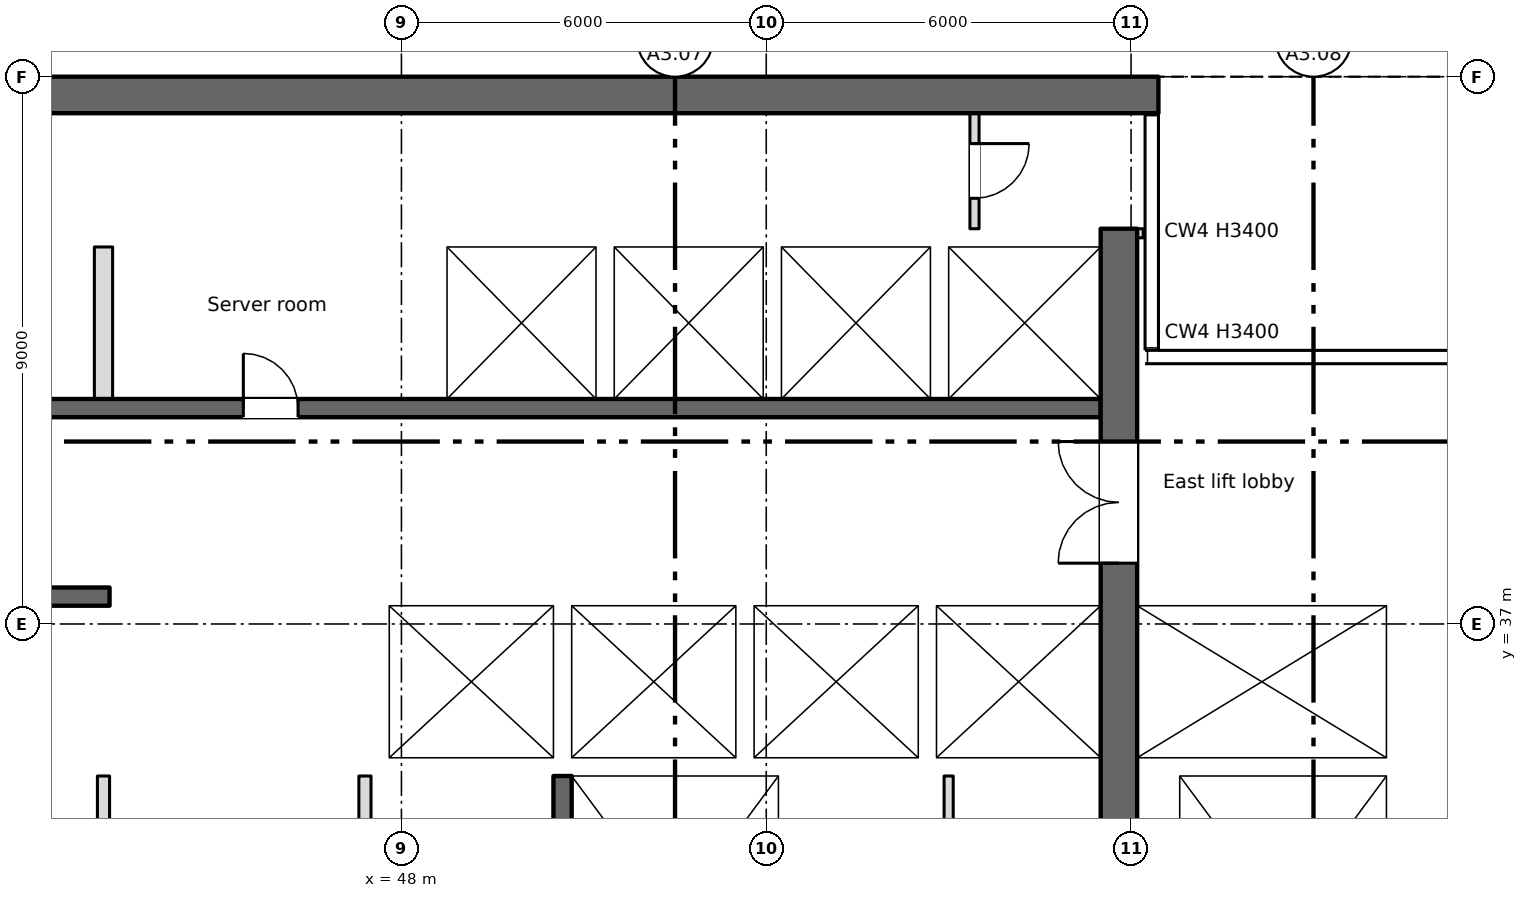
"""IFC4 building model, lengths in metres.
Left out: names, types, materials, properties, quantities, classifications, styles, units other than length and angle.
Written with IfcOpenShell. Run it as: python <this file> out.ifc"""

import sys

from ifc_helpers import new_model, si_unit, direction, frame, frame_2d, origin, place, context, subcontext, project, spatial, rectangle, extrude, element, fill, save


model = new_model("IFC4")
c1 = context("Model", 3, precision=1e-05, world=origin(), true_north=direction((0.0, 1.0)))
c2 = subcontext(c1, "Body", "Model", "MODEL_VIEW")
j1 = project(units=[si_unit("LENGTHUNIT", "METRE"), si_unit("PLANEANGLEUNIT", "RADIAN")], contexts=[c1])
p1 = place(None, origin())
s1 = spatial("IfcSite", under=j1, at=p1, CompositionType="ELEMENT")
p2 = place(p1, origin())
s2 = spatial("IfcBuilding", under=s1, at=p2, CompositionType="ELEMENT")
p3 = place(p2, frame((0.0, 0.0, 239.35)))
s3 = spatial("IfcBuildingStorey", under=s2, at=p3, CompositionType="ELEMENT", Elevation=239.35)
p4 = place(p3, frame((11.55, 45.7, 0.0), z_axis=(0.0, 0.0, 1.0), x_axis=(1.0, 0.0, 0.0)))
e1 = element("IfcWall", 1, at=p4, inside=s3, PredefinedType="SHEAR", context=c2, shape_type="SweptSolid", body=[
    extrude(rectangle(XDim=48.9, YDim=0.6, at=frame_2d((24.45, 0.0))), origin(), (0.0, 0.0, 1.0), 3.4),
])
p5 = place(p4, frame((1.2, 0.0, 0.6)))
e2 = element("IfcOpeningElement", 2, at=p5, cuts=e1, PredefinedType="OPENING", context=c2, shape_type="SweptSolid", body=[
    extrude(rectangle(XDim=0.6, YDim=2.4, at=frame_2d((0.3, 1.2))), frame((0.0, 0.31, 0.0), z_axis=(0.0, -1.0, 0.0), x_axis=(1.0, 0.0, 0.0)), (0.0, 0.0, 1.0), 0.62),
])
p6 = place(p3, frame((64.35, 34.8, 0.0), z_axis=(0.0, 0.0, 1.0), x_axis=(0.0, 1.0, 0.0)))
e3 = element("IfcWall", 3, at=p6, inside=s3, PredefinedType="SHEAR", context=c2, shape_type="SweptSolid", body=[
    extrude(rectangle(XDim=6.45, YDim=0.3, at=frame_2d((3.225, 0.0))), origin(), (0.0, 0.0, 1.0), 3.4),
])
p7 = place(p3, frame((59.8, 28.4, 0.0), z_axis=(0.0, 0.0, 1.0), x_axis=(0.0, 1.0, 0.0)))
e4 = element("IfcWall", 4, at=p7, inside=s3, PredefinedType="SHEAR", context=c2, shape_type="SweptSolid", body=[
    extrude(rectangle(XDim=15.1, YDim=0.6, at=frame_2d((7.55, 0.0))), origin(), (0.0, 0.0, 1.0), 3.4),
])
p8 = place(p7, frame((9.6, 0.0, 0.0)))
e5 = element("IfcOpeningElement", 5, at=p8, cuts=e4, PredefinedType="OPENING", context=c2, shape_type="SweptSolid", body=[
    extrude(rectangle(XDim=2.0, YDim=2.1, at=frame_2d((1.0, 1.05))), frame((0.0, 0.31, 0.0), z_axis=(0.0, -1.0, 0.0), x_axis=(1.0, 0.0, 0.0)), (0.0, 0.0, 1.0), 0.62),
])
p9 = place(p3, frame((50.65, 34.5, 0.0), z_axis=(0.0, 0.0, 1.0), x_axis=(0.0, -1.0, 0.0)))
e6 = element("IfcWall", 6, at=p9, inside=s3, PredefinedType="SHEAR", context=c2, shape_type="SweptSolid", body=[
    extrude(rectangle(XDim=6.1, YDim=0.3, at=frame_2d((3.05, 0.0))), origin(), (0.0, 0.0, 1.0), 3.4),
])
p10 = place(p9, frame((4.95, 0.0, 0.0)))
e7 = element("IfcOpeningElement", 7, at=p10, cuts=e6, PredefinedType="OPENING", context=c2, shape_type="SweptSolid", body=[
    extrude(rectangle(XDim=1.1, YDim=2.1, at=frame_2d((0.55, 1.05))), frame((0.0, 0.16, 0.0), z_axis=(0.0, -1.0, 0.0), x_axis=(1.0, 0.0, 0.0)), (0.0, 0.0, 1.0), 0.32),
])
p11 = place(p3, frame((54.35, 28.4, 0.0), z_axis=(0.0, 0.0, 1.0), x_axis=(0.0, 1.0, 0.0)))
e8 = element("IfcWall", 8, at=p11, inside=s3, PredefinedType="SHEAR", context=c2, shape_type="SweptSolid", body=[
    extrude(rectangle(XDim=6.1, YDim=0.3, at=frame_2d((3.05, 0.0))), origin(), (0.0, 0.0, 1.0), 3.4),
])
p12 = place(p3, frame((60.45, 28.4, 0.0), z_axis=(0.0, 0.0, 1.0), x_axis=(0.0, 1.0, 0.0)))
e9 = element("IfcWall", 9, at=p12, inside=s3, PredefinedType="SHEAR", context=c2, shape_type="SweptSolid", body=[
    extrude(rectangle(XDim=6.1, YDim=0.7, at=frame_2d((3.05, 0.0))), origin(), (0.0, 0.0, 1.0), 3.4),
])
p13 = place(p3, frame((64.35, 28.4, 0.0), z_axis=(0.0, 0.0, 1.0), x_axis=(0.0, 1.0, 0.0)))
e10 = element("IfcWall", 10, at=p13, inside=s3, PredefinedType="SHEAR", context=c2, shape_type="SweptSolid", body=[
    extrude(rectangle(XDim=6.1, YDim=0.3, at=frame_2d((3.05, 0.0))), origin(), (0.0, 0.0, 1.0), 3.4),
])
p14 = place(p3, frame((34.8, 34.65, 0.0), z_axis=(0.0, 0.0, 1.0), x_axis=(1.0, 0.0, 0.0)))
e11 = element("IfcWall", 11, at=p14, inside=s3, PredefinedType="SHEAR", context=c2, shape_type="SweptSolid", body=[
    extrude(rectangle(XDim=8.4, YDim=0.3, at=frame_2d((4.2, 0.0))), origin(), (0.0, 0.0, 1.0), 3.4),
])
p15 = place(p3, frame((47.3, 34.65, 0.0), z_axis=(0.0, 0.0, 1.0), x_axis=(1.0, 0.0, 0.0)))
e12 = element("IfcWall", 12, at=p15, inside=s3, PredefinedType="SHEAR", context=c2, shape_type="SweptSolid", body=[
    extrude(rectangle(XDim=12.2, YDim=0.3, at=frame_2d((6.1, 0.0))), origin(), (0.0, 0.0, 1.0), 3.4),
])
p16 = place(p15, frame((1.3, 0.0, 0.0)))
e13 = element("IfcOpeningElement", 13, at=p16, cuts=e12, PredefinedType="OPENING", context=c2, shape_type="SweptSolid", body=[
    extrude(rectangle(XDim=1.1, YDim=2.1, at=frame_2d((0.55, 1.05))), frame((0.0, 0.16, 0.0), z_axis=(0.0, -1.0, 0.0), x_axis=(1.0, 0.0, 0.0)), (0.0, 0.0, 1.0), 0.32),
])
p17 = place(p3, frame((60.1, 34.65, 0.0), z_axis=(0.0, 0.0, 1.0), x_axis=(1.0, 0.0, 0.0)))
e14 = element("IfcWall", 14, at=p17, inside=s3, PredefinedType="SHEAR", context=c2, shape_type="SweptSolid", body=[
    extrude(rectangle(XDim=4.4, YDim=0.3, at=frame_2d((2.2, 0.0))), origin(), (0.0, 0.0, 1.0), 3.4),
])
p18 = place(p3, frame((43.2, 37.45, 0.0), z_axis=(0.0, 0.0, 1.0), x_axis=(-1.0, 0.0, 0.0)))
e15 = element("IfcWall", 15, at=p18, inside=s3, PredefinedType="SHEAR", context=c2, shape_type="SweptSolid", body=[
    extrude(rectangle(XDim=8.4, YDim=0.3, at=frame_2d((4.2, 0.0))), origin(), (0.0, 0.0, 1.0), 3.4),
])
p19 = place(p18, frame((3.75, 0.0, 0.0)))
e16 = element("IfcOpeningElement", 16, at=p19, cuts=e15, PredefinedType="OPENING", context=c2, shape_type="SweptSolid", body=[
    extrude(rectangle(XDim=0.9, YDim=2.1, at=frame_2d((0.45, 1.05))), frame((0.0, 0.16, 0.0), z_axis=(0.0, -1.0, 0.0), x_axis=(1.0, 0.0, 0.0)), (0.0, 0.0, 1.0), 0.32),
])
p20 = place(p3, frame((47.3, 37.45, 0.0), z_axis=(0.0, 0.0, 1.0), x_axis=(1.0, 0.0, 0.0)))
e17 = element("IfcWall", 17, at=p20, inside=s3, PredefinedType="SHEAR", context=c2, shape_type="SweptSolid", body=[
    extrude(rectangle(XDim=12.2, YDim=0.3, at=frame_2d((6.1, 0.0))), origin(), (0.0, 0.0, 1.0), 3.4),
])
p21 = place(p20, frame((4.3, 0.0, 0.0)))
e18 = element("IfcOpeningElement", 18, at=p21, cuts=e17, PredefinedType="OPENING", context=c2, shape_type="SweptSolid", body=[
    extrude(rectangle(XDim=1.1, YDim=2.1, at=frame_2d((0.55, 1.05))), frame((0.0, 0.16, 0.0), z_axis=(0.0, -1.0, 0.0), x_axis=(1.0, 0.0, 0.0)), (0.0, 0.0, 1.0), 0.32),
])
p22 = place(p20, frame((7.3, 0.0, 0.0)))
e19 = element("IfcOpeningElement", 19, at=p22, cuts=e17, PredefinedType="OPENING", context=c2, shape_type="SweptSolid", body=[
    extrude(rectangle(XDim=1.1, YDim=2.1, at=frame_2d((0.55, 1.05))), frame((0.0, 0.16, 0.0), z_axis=(0.0, -1.0, 0.0), x_axis=(1.0, 0.0, 0.0)), (0.0, 0.0, 1.0), 0.32),
])
p23 = place(p20, frame((10.3, 0.0, 0.0)))
e20 = element("IfcOpeningElement", 20, at=p23, cuts=e17, PredefinedType="OPENING", context=c2, shape_type="SweptSolid", body=[
    extrude(rectangle(XDim=1.1, YDim=2.1, at=frame_2d((0.55, 1.05))), frame((0.0, 0.16, 0.0), z_axis=(0.0, -1.0, 0.0), x_axis=(1.0, 0.0, 0.0)), (0.0, 0.0, 1.0), 0.32),
])
p24 = place(p3, frame((60.1, 37.45, 0.0), z_axis=(0.0, 0.0, 1.0), x_axis=(1.0, 0.0, 0.0)))
e21 = element("IfcWall", 21, at=p24, inside=s3, PredefinedType="SHEAR", context=c2, shape_type="SweptSolid", body=[
    extrude(rectangle(XDim=4.1, YDim=0.3, at=frame_2d((2.05, 0.0))), origin(), (0.0, 0.0, 1.0), 3.4),
])
p25 = place(p24, frame((1.5, 0.0, 0.0)))
e22 = element("IfcOpeningElement", 22, at=p25, cuts=e21, PredefinedType="OPENING", context=c2, shape_type="SweptSolid", body=[
    extrude(rectangle(XDim=1.1, YDim=2.1, at=frame_2d((0.55, 1.05))), frame((0.0, 0.16, 0.0), z_axis=(0.0, -1.0, 0.0), x_axis=(1.0, 0.0, 0.0)), (0.0, 0.0, 1.0), 0.32),
])
p26 = place(p3, frame((43.05, 34.8, 0.0), z_axis=(0.0, 0.0, 1.0), x_axis=(0.0, 1.0, 0.0)))
e23 = element("IfcWall", 23, at=p26, inside=s3, PredefinedType="SHEAR", context=c2, shape_type="SweptSolid", body=[
    extrude(rectangle(XDim=2.5, YDim=0.3, at=frame_2d((1.25, 0.0))), origin(), (0.0, 0.0, 1.0), 3.4),
])
p27 = place(p3, frame((47.55, 34.8, 0.0), z_axis=(0.0, 0.0, 1.0), x_axis=(0.0, 1.0, 0.0)))
e24 = element("IfcWall", 24, at=p27, inside=s3, PredefinedType="SHEAR", context=c2, shape_type="SweptSolid", body=[
    extrude(rectangle(XDim=2.5, YDim=0.5, at=frame_2d((1.25, 0.0))), origin(), (0.0, 0.0, 1.0), 3.4),
])
p28 = place(p3, frame((50.65, 34.8, 0.0), z_axis=(0.0, 0.0, 1.0), x_axis=(0.0, 1.0, 0.0)))
e25 = element("IfcWall", 25, at=p28, inside=s3, PredefinedType="SHEAR", context=c2, shape_type="SweptSolid", body=[
    extrude(rectangle(XDim=2.5, YDim=0.3, at=frame_2d((1.25, 0.0))), origin(), (0.0, 0.0, 1.0), 3.4),
])
p29 = place(p3, frame((18.5, 40.55, 0.0), z_axis=(0.0, 0.0, 1.0), x_axis=(1.0, 0.0, 0.0)))
e26 = element("IfcWall", 26, at=p29, inside=s3, PredefinedType="SHEAR", context=c2, shape_type="SweptSolid", body=[
    extrude(rectangle(XDim=41.0, YDim=0.3, at=frame_2d((20.5, 0.0))), origin(), (0.0, 0.0, 1.0), 3.4),
])
p30 = place(p29, frame((2.15, 0.0, 0.0)))
e27 = element("IfcOpeningElement", 27, at=p30, cuts=e26, PredefinedType="OPENING", context=c2, shape_type="SweptSolid", body=[
    extrude(rectangle(XDim=0.9, YDim=2.1, at=frame_2d((0.45, 1.05))), frame((0.0, 0.16, 0.0), z_axis=(0.0, -1.0, 0.0), x_axis=(1.0, 0.0, 0.0)), (0.0, 0.0, 1.0), 0.32),
])
p31 = place(p29, frame((15.9, 0.0, 0.0)))
e28 = element("IfcOpeningElement", 28, at=p31, cuts=e26, PredefinedType="OPENING", context=c2, shape_type="SweptSolid", body=[
    extrude(rectangle(XDim=0.9, YDim=2.1, at=frame_2d((0.45, 1.05))), frame((0.0, 0.16, 0.0), z_axis=(0.0, -1.0, 0.0), x_axis=(1.0, 0.0, 0.0)), (0.0, 0.0, 1.0), 0.32),
])
p32 = place(p29, frame((21.4, 0.0, 0.0)))
e29 = element("IfcOpeningElement", 29, at=p32, cuts=e26, PredefinedType="OPENING", context=c2, shape_type="SweptSolid", body=[
    extrude(rectangle(XDim=0.9, YDim=2.1, at=frame_2d((0.45, 1.05))), frame((0.0, 0.16, 0.0), z_axis=(0.0, -1.0, 0.0), x_axis=(1.0, 0.0, 0.0)), (0.0, 0.0, 1.0), 0.32),
])
p33 = place(p29, frame((26.9, 0.0, 0.0)))
e30 = element("IfcOpeningElement", 30, at=p33, cuts=e26, PredefinedType="OPENING", context=c2, shape_type="SweptSolid", body=[
    extrude(rectangle(XDim=0.9, YDim=2.1, at=frame_2d((0.45, 1.05))), frame((0.0, 0.16, 0.0), z_axis=(0.0, -1.0, 0.0), x_axis=(1.0, 0.0, 0.0)), (0.0, 0.0, 1.0), 0.32),
])
p34 = place(p29, frame((6.175, 0.0, 0.0)))
e31 = element("IfcOpeningElement", 31, at=p34, cuts=e26, PredefinedType="OPENING", context=c2, shape_type="SweptSolid", body=[
    extrude(rectangle(XDim=1.1, YDim=2.1, at=frame_2d((0.55, 1.05))), frame((0.0, 0.16, 0.0), z_axis=(0.0, -1.0, 0.0), x_axis=(1.0, 0.0, 0.0)), (0.0, 0.0, 1.0), 0.32),
])
p35 = place(p29, frame((8.925, 0.0, 0.0)))
e32 = element("IfcOpeningElement", 32, at=p35, cuts=e26, PredefinedType="OPENING", context=c2, shape_type="SweptSolid", body=[
    extrude(rectangle(XDim=1.1, YDim=2.1, at=frame_2d((0.55, 1.05))), frame((0.0, 0.16, 0.0), z_axis=(0.0, -1.0, 0.0), x_axis=(1.0, 0.0, 0.0)), (0.0, 0.0, 1.0), 0.32),
])
p36 = place(p29, frame((11.675, 0.0, 0.0)))
e33 = element("IfcOpeningElement", 33, at=p36, cuts=e26, PredefinedType="OPENING", context=c2, shape_type="SweptSolid", body=[
    extrude(rectangle(XDim=1.1, YDim=2.1, at=frame_2d((0.55, 1.05))), frame((0.0, 0.16, 0.0), z_axis=(0.0, -1.0, 0.0), x_axis=(1.0, 0.0, 0.0)), (0.0, 0.0, 1.0), 0.32),
])
p37 = place(p29, frame((30.925, 0.0, 0.0)))
e34 = element("IfcOpeningElement", 34, at=p37, cuts=e26, PredefinedType="OPENING", context=c2, shape_type="SweptSolid", body=[
    extrude(rectangle(XDim=1.1, YDim=2.1, at=frame_2d((0.55, 1.05))), frame((0.0, 0.16, 0.0), z_axis=(0.0, -1.0, 0.0), x_axis=(1.0, 0.0, 0.0)), (0.0, 0.0, 1.0), 0.32),
])
p38 = place(p29, frame((33.675, 0.0, 0.0)))
e35 = element("IfcOpeningElement", 35, at=p38, cuts=e26, PredefinedType="OPENING", context=c2, shape_type="SweptSolid", body=[
    extrude(rectangle(XDim=1.1, YDim=2.1, at=frame_2d((0.55, 1.05))), frame((0.0, 0.16, 0.0), z_axis=(0.0, -1.0, 0.0), x_axis=(1.0, 0.0, 0.0)), (0.0, 0.0, 1.0), 0.32),
])
p39 = place(p29, frame((36.375, 0.0, 0.0)))
e36 = element("IfcOpeningElement", 36, at=p39, cuts=e26, PredefinedType="OPENING", context=c2, shape_type="SweptSolid", body=[
    extrude(rectangle(XDim=1.2, YDim=2.1, at=frame_2d((0.6, 1.05))), frame((0.0, 0.16, 0.0), z_axis=(0.0, -1.0, 0.0), x_axis=(1.0, 0.0, 0.0)), (0.0, 0.0, 1.0), 0.32),
])
p40 = place(p29, frame((39.15, 0.0, 0.0)))
e37 = element("IfcOpeningElement", 37, at=p40, cuts=e26, PredefinedType="OPENING", context=c2, shape_type="SweptSolid", body=[
    extrude(rectangle(XDim=1.2, YDim=2.1, at=frame_2d((0.6, 1.05))), frame((0.0, 0.16, 0.0), z_axis=(0.0, -1.0, 0.0), x_axis=(1.0, 0.0, 0.0)), (0.0, 0.0, 1.0), 0.32),
])
p41 = place(p3, frame((18.5, 43.35, 0.0), z_axis=(0.0, 0.0, 1.0), x_axis=(1.0, 0.0, 0.0)))
e38 = element("IfcWall", 38, at=p41, inside=s3, PredefinedType="SHEAR", context=c2, shape_type="SweptSolid", body=[
    extrude(rectangle(XDim=41.0, YDim=0.3, at=frame_2d((20.5, 0.0))), origin(), (0.0, 0.0, 1.0), 3.4),
])
for number, where, z_axis, x_axis in (
    (39, (53.65, 34.8, 0.0), (0.0, 0.0, 1.0), (0.0, 1.0, 0.0)),
    (40, (56.65, 34.8, 0.0), (0.0, 0.0, 1.0), (0.0, 1.0, 0.0)),
    (41, (48.6, 40.7, 0.0), (0.0, 0.0, 1.0), (0.0, 1.0, 0.0)),
    (42, (51.35, 40.7, 0.0), (0.0, 0.0, 1.0), (0.0, 1.0, 0.0)),
    (43, (54.1, 40.7, 0.0), (0.0, 0.0, 1.0), (0.0, 1.0, 0.0)),
    (44, (56.85, 40.7, 0.0), (0.0, 0.0, 1.0), (0.0, 1.0, 0.0)),
):
    element("IfcWall", number, at=place(p3, frame(where, z_axis=z_axis, x_axis=x_axis)), inside=s3, PredefinedType="SHEAR", context=c2, shape_type="SweptSolid", body=[
        extrude(rectangle(XDim=2.5, YDim=0.3, at=frame_2d((1.25, 0.0))), origin(), (0.0, 0.0, 1.0), 3.4),
    ])
for number, where, z_axis, x_axis in (
    (45, (43.1, 28.4, 0.0), (0.0, 0.0, 1.0), (0.0, 1.0, 0.0)),
    (46, (47.4, 28.4, 0.0), (0.0, 0.0, 1.0), (0.0, 1.0, 0.0)),
):
    element("IfcWall", number, at=place(p3, frame(where, z_axis=z_axis, x_axis=x_axis)), inside=s3, PredefinedType="PARTITIONING", context=c2, shape_type="SweptSolid", body=[
        extrude(rectangle(XDim=6.1, YDim=0.2, at=frame_2d((3.05, 0.0))), origin(), (0.0, 0.0, 1.0), 3.4),
    ])
p42 = place(p3, frame((57.0, 28.4, 0.0), z_axis=(0.0, 0.0, 1.0), x_axis=(0.0, 1.0, 0.0)))
e47 = element("IfcWall", 47, at=p42, inside=s3, PredefinedType="PARTITIONING", context=c2, shape_type="SweptSolid", body=[
    extrude(rectangle(XDim=6.1, YDim=0.15, at=frame_2d((3.05, 0.0))), origin(), (0.0, 0.0, 1.0), 3.4),
])
p43 = place(p3, frame((57.425, 45.4, 0.0), z_axis=(0.0, 0.0, 1.0), x_axis=(0.0, -1.0, 0.0)))
e48 = element("IfcWall", 48, at=p43, inside=s3, PredefinedType="PARTITIONING", context=c2, shape_type="SweptSolid", body=[
    extrude(rectangle(XDim=1.9, YDim=0.15, at=frame_2d((0.95, 0.0))), origin(), (0.0, 0.0, 1.0), 3.4),
])
p44 = place(p43, frame((0.5, 0.0, 0.0)))
e49 = element("IfcOpeningElement", 49, at=p44, cuts=e48, PredefinedType="OPENING", context=c2, shape_type="SweptSolid", body=[
    extrude(rectangle(XDim=0.9, YDim=2.1, at=frame_2d((0.45, 1.05))), frame((0.0, 0.085, 0.0), z_axis=(0.0, -1.0, 0.0), x_axis=(1.0, 0.0, 0.0)), (0.0, 0.0, 1.0), 0.17),
])
p45 = place(p3, frame((60.15, 43.35, 0.0), z_axis=(0.0, 0.0, 1.0), x_axis=(0.0, 1.0, 0.0)))
e50 = element("IfcWall", 50, at=p45, inside=s3, PredefinedType="PARTITIONING", context=c2, shape_type="SweptSolid", body=[
    extrude(rectangle(XDim=0.15, YDim=0.1, at=frame_2d((0.075, 0.0))), origin(), (0.0, 0.0, 1.0), 3.4),
])
p46 = place(p3, frame((43.1, 40.7, 0.0), z_axis=(0.0, 0.0, 1.0), x_axis=(0.0, 1.0, 0.0)))
e51 = element("IfcWall", 51, at=p46, inside=s3, PredefinedType="PARTITIONING", context=c2, shape_type="SweptSolid", body=[
    extrude(rectangle(XDim=2.5, YDim=0.3, at=frame_2d((1.25, 0.0))), origin(), (0.0, 0.0, 1.0), 3.4),
])
p47 = place(p44, origin())
e52 = element("IfcDoor", 52, at=p47, inside=s3, OperationType="SINGLE_SWING_LEFT", PredefinedType="DOOR", context=c2, shape_type="SweptSolid", body=[
    extrude(rectangle(XDim=0.9, YDim=2.1, at=frame_2d((0.45, 1.05))), frame((0.0, 0.025, 0.0), z_axis=(0.0, -1.0, 0.0), x_axis=(1.0, 0.0, 0.0)), (0.0, 0.0, 1.0), 0.05),
])
fill(e49, e52)
p48 = place(p33, origin())
e53 = element("IfcDoor", 53, at=p48, inside=s3, OperationType="SINGLE_SWING_LEFT", PredefinedType="DOOR", context=c2, shape_type="SweptSolid", body=[
    extrude(rectangle(XDim=0.9, YDim=2.1, at=frame_2d((0.45, 1.05))), frame((0.0, 0.025, 0.0), z_axis=(0.0, -1.0, 0.0), x_axis=(1.0, 0.0, 0.0)), (0.0, 0.0, 1.0), 0.05),
])
fill(e30, e53)
p49 = place(p21, origin())
e54 = element("IfcDoor", 54, at=p49, inside=s3, OperationType="SLIDING_TO_LEFT", PredefinedType="DOOR", context=c2, shape_type="SweptSolid", body=[
    extrude(rectangle(XDim=1.1, YDim=2.1, at=frame_2d((0.55, 1.05))), frame((0.0, 0.025, 0.0), z_axis=(0.0, -1.0, 0.0), x_axis=(1.0, 0.0, 0.0)), (0.0, 0.0, 1.0), 0.05),
])
fill(e18, e54)
p50 = place(p22, origin())
e55 = element("IfcDoor", 55, at=p50, inside=s3, OperationType="SLIDING_TO_LEFT", PredefinedType="DOOR", context=c2, shape_type="SweptSolid", body=[
    extrude(rectangle(XDim=1.1, YDim=2.1, at=frame_2d((0.55, 1.05))), frame((0.0, 0.025, 0.0), z_axis=(0.0, -1.0, 0.0), x_axis=(1.0, 0.0, 0.0)), (0.0, 0.0, 1.0), 0.05),
])
fill(e19, e55)
p51 = place(p23, origin())
e56 = element("IfcDoor", 56, at=p51, inside=s3, OperationType="SLIDING_TO_LEFT", PredefinedType="DOOR", context=c2, shape_type="SweptSolid", body=[
    extrude(rectangle(XDim=1.1, YDim=2.1, at=frame_2d((0.55, 1.05))), frame((0.0, 0.025, 0.0), z_axis=(0.0, -1.0, 0.0), x_axis=(1.0, 0.0, 0.0)), (0.0, 0.0, 1.0), 0.05),
])
fill(e20, e56)
p52 = place(p37, origin())
e57 = element("IfcDoor", 57, at=p52, inside=s3, OperationType="SLIDING_TO_LEFT", PredefinedType="DOOR", context=c2, shape_type="SweptSolid", body=[
    extrude(rectangle(XDim=1.1, YDim=2.1, at=frame_2d((0.55, 1.05))), frame((0.0, 0.025, 0.0), z_axis=(0.0, -1.0, 0.0), x_axis=(1.0, 0.0, 0.0)), (0.0, 0.0, 1.0), 0.05),
])
fill(e34, e57)
p53 = place(p38, origin())
e58 = element("IfcDoor", 58, at=p53, inside=s3, OperationType="SLIDING_TO_LEFT", PredefinedType="DOOR", context=c2, shape_type="SweptSolid", body=[
    extrude(rectangle(XDim=1.1, YDim=2.1, at=frame_2d((0.55, 1.05))), frame((0.0, 0.025, 0.0), z_axis=(0.0, -1.0, 0.0), x_axis=(1.0, 0.0, 0.0)), (0.0, 0.0, 1.0), 0.05),
])
fill(e35, e58)
p54 = place(p39, origin())
e59 = element("IfcDoor", 59, at=p54, inside=s3, OperationType="SLIDING_TO_LEFT", PredefinedType="DOOR", context=c2, shape_type="SweptSolid", body=[
    extrude(rectangle(XDim=1.2, YDim=2.1, at=frame_2d((0.6, 1.05))), frame((0.0, 0.025, 0.0), z_axis=(0.0, -1.0, 0.0), x_axis=(1.0, 0.0, 0.0)), (0.0, 0.0, 1.0), 0.05),
])
fill(e36, e59)
p55 = place(p40, origin())
e60 = element("IfcDoor", 60, at=p55, inside=s3, OperationType="SLIDING_TO_LEFT", PredefinedType="DOOR", context=c2, shape_type="SweptSolid", body=[
    extrude(rectangle(XDim=1.2, YDim=2.1, at=frame_2d((0.6, 1.05))), frame((0.0, 0.025, 0.0), z_axis=(0.0, -1.0, 0.0), x_axis=(1.0, 0.0, 0.0)), (0.0, 0.0, 1.0), 0.05),
])
fill(e37, e60)
p56 = place(p25, origin())
e61 = element("IfcDoor", 61, at=p56, inside=s3, OperationType="SLIDING_TO_LEFT", PredefinedType="DOOR", context=c2, shape_type="SweptSolid", body=[
    extrude(rectangle(XDim=1.1, YDim=2.1, at=frame_2d((0.55, 1.05))), frame((0.0, 0.025, 0.0), z_axis=(0.0, -1.0, 0.0), x_axis=(1.0, 0.0, 0.0)), (0.0, 0.0, 1.0), 0.05),
])
fill(e22, e61)
p57 = place(p16, origin())
e62 = element("IfcDoor", 62, at=p57, inside=s3, OperationType="SLIDING_TO_LEFT", PredefinedType="DOOR", context=c2, shape_type="SweptSolid", body=[
    extrude(rectangle(XDim=1.1, YDim=2.1, at=frame_2d((0.55, 1.05))), frame((0.0, 0.025, 0.0), z_axis=(0.0, -1.0, 0.0), x_axis=(1.0, 0.0, 0.0)), (0.0, 0.0, 1.0), 0.05),
])
fill(e13, e62)
p58 = place(p8, origin())
e63 = element("IfcDoor", 63, at=p58, inside=s3, OperationType="DOUBLE_DOOR_SINGLE_SWING", PredefinedType="DOOR", context=c2, shape_type="SweptSolid", body=[
    extrude(rectangle(XDim=2.0, YDim=2.1, at=frame_2d((1.0, 1.05))), frame((0.0, 0.025, 0.0), z_axis=(0.0, -1.0, 0.0), x_axis=(1.0, 0.0, 0.0)), (0.0, 0.0, 1.0), 0.05),
])
fill(e5, e63)
save(model, sys.argv[1])
